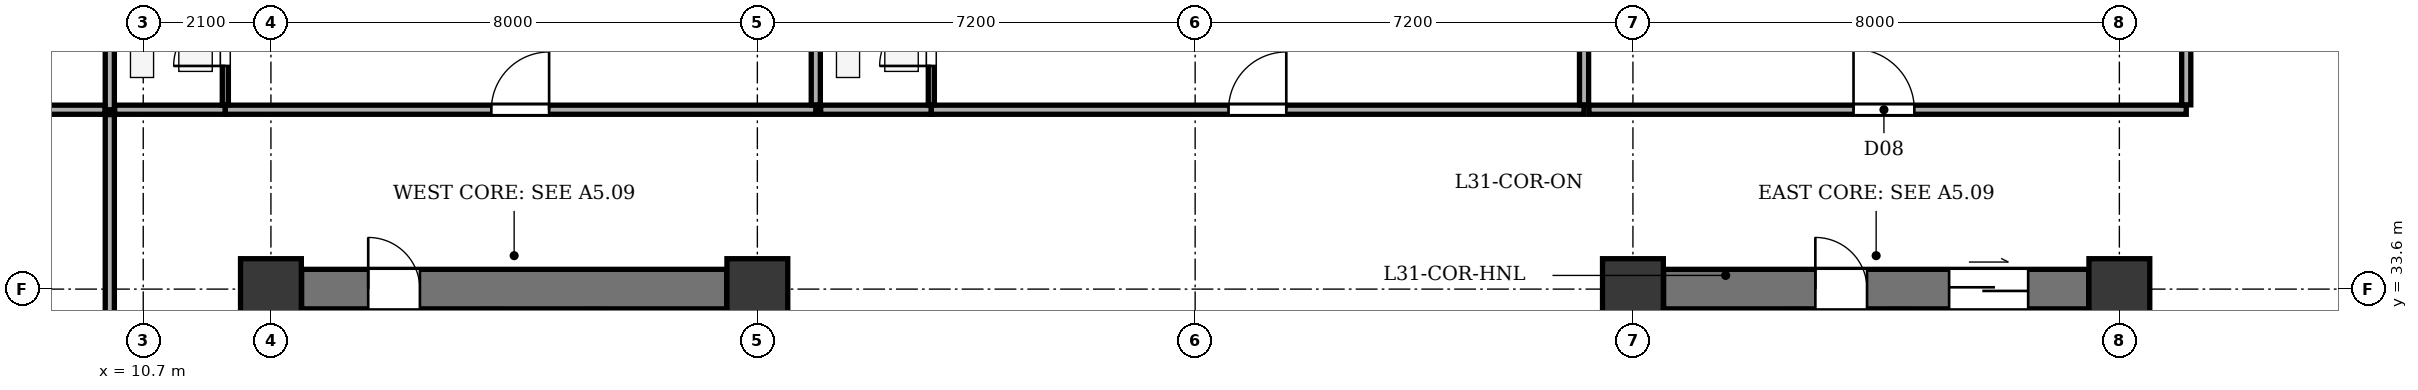
"""IFC4 building model, lengths in metres.
Left out: names, types, materials, properties, quantities, classifications, styles, units other than length and angle.
Written with IfcOpenShell. Run it as: python <this file> out.ifc"""

import sys

from ifc_helpers import new_model, si_unit, direction, frame, frame_2d, origin, origin_2d, place, context, subcontext, project, spatial, rectangle, extrude, element, fill, save


model = new_model("IFC4")
c1 = context("Model", 3, precision=1e-05, world=origin(), true_north=direction((0.0, 1.0)))
c2 = subcontext(c1, "Body", "Model", "MODEL_VIEW")
j1 = project(units=[si_unit("LENGTHUNIT", "METRE"), si_unit("PLANEANGLEUNIT", "RADIAN")], contexts=[c1])
p1 = place(None, origin())
s1 = spatial("IfcSite", under=j1, at=p1, CompositionType="ELEMENT")
p2 = place(p1, origin())
s2 = spatial("IfcBuilding", under=s1, at=p2, CompositionType="ELEMENT")
p3 = place(p2, frame((0.0, 0.0, 127.3)))
s3 = spatial("IfcBuildingStorey", under=s2, at=p3, CompositionType="ELEMENT", Elevation=127.3)
for number, where, z_axis, x_axis in (
    (1, (12.8, 33.6, 0.0), (0.0, 0.0, 1.0), (1.0, 0.0, 0.0)),
    (2, (20.8, 33.6, 0.0), (0.0, 0.0, 1.0), (1.0, 0.0, 0.0)),
    (3, (35.2, 33.6, 0.0), (0.0, 0.0, 1.0), (1.0, 0.0, 0.0)),
    (4, (43.2, 33.6, 0.0), (0.0, 0.0, 1.0), (1.0, 0.0, 0.0)),
):
    element("IfcColumn", number, at=place(p3, frame(where, z_axis=z_axis, x_axis=x_axis)), inside=s3, PredefinedType="COLUMN", context=c2, shape_type="SweptSolid", body=[
        extrude(rectangle(XDim=1.0, YDim=1.0, at=origin_2d()), origin(), (0.0, 0.0, 1.0), 3.5),
    ])
p4 = place(p3, frame((13.305, 33.6, 0.0), z_axis=(0.0, 0.0, 1.0), x_axis=(1.0, 0.0, 0.0)))
e5 = element("IfcWall", 5, at=p4, inside=s3, PredefinedType="SHEAR", context=c2, shape_type="SweptSolid", body=[
    extrude(rectangle(XDim=6.99, YDim=0.65, at=frame_2d((3.495, 0.0))), origin(), (0.0, 0.0, 1.0), 3.2),
])
p5 = place(p4, frame((1.095, 0.0, 0.0)))
e6 = element("IfcOpeningElement", 6, at=p5, cuts=e5, PredefinedType="OPENING", context=c2, shape_type="SweptSolid", body=[
    extrude(rectangle(XDim=0.85, YDim=2.02, at=frame_2d((0.425, 1.01))), frame((0.0, 0.335, 0.0), z_axis=(0.0, -1.0, 0.0), x_axis=(1.0, 0.0, 0.0)), (0.0, 0.0, 1.0), 0.67),
])
p6 = place(p3, frame((16.435, 21.135, 0.0), z_axis=(0.0, 0.0, 1.0), x_axis=(0.0, 1.0, 0.0)))
e7 = element("IfcWall", 7, at=p6, inside=s3, PredefinedType="SHEAR", context=c2, shape_type="SweptSolid", body=[
    extrude(rectangle(XDim=12.13, YDim=0.25, at=frame_2d((6.065, 0.0))), origin(), (0.0, 0.0, 1.0), 3.2),
])
p7 = place(p6, frame((0.515, 0.0, 0.0)))
e8 = element("IfcOpeningElement", 8, at=p7, cuts=e7, PredefinedType="OPENING", context=c2, shape_type="SweptSolid", body=[
    extrude(rectangle(XDim=1.2, YDim=2.15, at=frame_2d((0.6, 1.075))), frame((0.0, 0.135, 0.0), z_axis=(0.0, -1.0, 0.0), x_axis=(1.0, 0.0, 0.0)), (0.0, 0.0, 1.0), 0.27),
])
p8 = place(p6, frame((2.665, 0.0, 0.0)))
e9 = element("IfcOpeningElement", 9, at=p8, cuts=e7, PredefinedType="OPENING", context=c2, shape_type="SweptSolid", body=[
    extrude(rectangle(XDim=1.15, YDim=2.15, at=frame_2d((0.575, 1.075))), frame((0.0, 0.135, 0.0), z_axis=(0.0, -1.0, 0.0), x_axis=(1.0, 0.0, 0.0)), (0.0, 0.0, 1.0), 0.27),
])
p9 = place(p3, frame((18.12, 31.17, 0.0), z_axis=(0.0, 0.0, 1.0), x_axis=(0.0, 1.0, 0.0)))
e10 = element("IfcWall", 10, at=p9, inside=s3, PredefinedType="PARTITIONING", context=c2, shape_type="SweptSolid", body=[
    extrude(rectangle(XDim=2.095, YDim=0.18, at=frame_2d((1.047, 0.0))), origin(), (0.0, 0.0, 1.0), 3.2),
])
p10 = place(p3, frame((35.705, 33.6, 0.0), z_axis=(0.0, 0.0, 1.0), x_axis=(1.0, 0.0, 0.0)))
e11 = element("IfcWall", 11, at=p10, inside=s3, PredefinedType="SHEAR", context=c2, shape_type="SweptSolid", body=[
    extrude(rectangle(XDim=6.99, YDim=0.65, at=frame_2d((3.495, 0.0))), origin(), (0.0, 0.0, 1.0), 3.2),
])
p11 = place(p10, frame((4.695, 0.0, 0.0)))
e12 = element("IfcOpeningElement", 12, at=p11, cuts=e11, PredefinedType="OPENING", context=c2, shape_type="SweptSolid", body=[
    extrude(rectangle(XDim=1.3, YDim=2.15, at=frame_2d((0.65, 1.075))), frame((0.0, 0.335, 0.0), z_axis=(0.0, -1.0, 0.0), x_axis=(1.0, 0.0, 0.0)), (0.0, 0.0, 1.0), 0.67),
])
p12 = place(p10, frame((2.495, 0.0, 0.0)))
e13 = element("IfcOpeningElement", 13, at=p12, cuts=e11, PredefinedType="OPENING", context=c2, shape_type="SweptSolid", body=[
    extrude(rectangle(XDim=0.85, YDim=2.02, at=frame_2d((0.425, 1.01))), frame((0.0, 0.335, 0.0), z_axis=(0.0, -1.0, 0.0), x_axis=(1.0, 0.0, 0.0)), (0.0, 0.0, 1.0), 0.67),
])
p13 = place(p3, frame((39.565, 21.135, 0.0), z_axis=(0.0, 0.0, 1.0), x_axis=(0.0, 1.0, 0.0)))
e14 = element("IfcWall", 14, at=p13, inside=s3, PredefinedType="SHEAR", context=c2, shape_type="SweptSolid", body=[
    extrude(rectangle(XDim=12.13, YDim=0.25, at=frame_2d((6.065, 0.0))), origin(), (0.0, 0.0, 1.0), 3.2),
])
p14 = place(p13, frame((0.515, 0.0, 0.0)))
e15 = element("IfcOpeningElement", 15, at=p14, cuts=e14, PredefinedType="OPENING", context=c2, shape_type="SweptSolid", body=[
    extrude(rectangle(XDim=1.2, YDim=2.15, at=frame_2d((0.6, 1.075))), frame((0.0, 0.135, 0.0), z_axis=(0.0, -1.0, 0.0), x_axis=(1.0, 0.0, 0.0)), (0.0, 0.0, 1.0), 0.27),
])
p15 = place(p13, frame((2.665, 0.0, 0.0)))
e16 = element("IfcOpeningElement", 16, at=p15, cuts=e14, PredefinedType="OPENING", context=c2, shape_type="SweptSolid", body=[
    extrude(rectangle(XDim=1.15, YDim=2.15, at=frame_2d((0.575, 1.075))), frame((0.0, 0.135, 0.0), z_axis=(0.0, -1.0, 0.0), x_axis=(1.0, 0.0, 0.0)), (0.0, 0.0, 1.0), 0.27),
])
p16 = place(p3, frame((37.9, 25.27, 0.0), z_axis=(0.0, 0.0, 1.0), x_axis=(0.0, 1.0, 0.0)))
e17 = element("IfcWall", 17, at=p16, inside=s3, PredefinedType="SOLIDWALL", context=c2, shape_type="SweptSolid", body=[
    extrude(rectangle(XDim=7.995, YDim=0.2, at=frame_2d((3.998, 0.0))), origin(), (0.0, 0.0, 1.0), 3.2),
])
p17 = place(p3, frame((10.15, 36.55, 0.0), z_axis=(0.0, 0.0, 1.0), x_axis=(0.0, 1.0, 0.0)))
e18 = element("IfcWall", 18, at=p17, inside=s3, PredefinedType="PARTITIONING", context=c2, shape_type="SweptSolid", body=[
    extrude(rectangle(XDim=9.575, YDim=0.15, at=frame_2d((4.788, 0.0))), origin(), (0.0, 0.0, 1.0), 3.2),
])
p18 = place(p3, frame((10.23, 36.55, 0.0), z_axis=(0.0, 0.0, 1.0), x_axis=(1.0, 0.0, 0.0)))
e19 = element("IfcWall", 19, at=p18, inside=s3, PredefinedType="PARTITIONING", context=c2, shape_type="SweptSolid", body=[
    extrude(rectangle(XDim=1.82, YDim=0.15, at=frame_2d((0.91, 0.0))), origin(), (0.0, 0.0, 1.0), 3.2),
])
p19 = place(p3, frame((12.05, 36.55, 0.0), z_axis=(0.0, 0.0, 1.0), x_axis=(1.0, 0.0, 0.0)))
e20 = element("IfcWall", 20, at=p19, inside=s3, PredefinedType="PARTITIONING", context=c2, shape_type="SweptSolid", body=[
    extrude(rectangle(XDim=9.711, YDim=0.15, at=frame_2d((4.855, 0.0))), origin(), (0.0, 0.0, 1.0), 3.2),
])
p20 = place(p19, frame((4.375, 0.0, 0.0)))
e21 = element("IfcOpeningElement", 21, at=p20, cuts=e20, PredefinedType="OPENING", context=c2, shape_type="SweptSolid", body=[
    extrude(rectangle(XDim=0.95, YDim=2.1, at=frame_2d((0.475, 1.05))), frame((0.0, 0.085, 0.0), z_axis=(0.0, -1.0, 0.0), x_axis=(1.0, 0.0, 0.0)), (0.0, 0.0, 1.0), 0.17),
])
p21 = place(p3, frame((12.05, 36.63, 0.0), z_axis=(0.0, 0.0, 1.0), x_axis=(0.0, 1.0, 0.0)))
e22 = element("IfcWall", 22, at=p21, inside=s3, PredefinedType="PARTITIONING", context=c2, shape_type="SweptSolid", body=[
    extrude(rectangle(XDim=2.25, YDim=0.1, at=frame_2d((1.125, 0.0))), origin(), (0.0, 0.0, 1.0), 3.2),
])
p22 = place(p21, frame((0.64, 0.0, 0.0)))
e23 = element("IfcOpeningElement", 23, at=p22, cuts=e22, PredefinedType="OPENING", context=c2, shape_type="SweptSolid", body=[
    extrude(rectangle(XDim=0.85, YDim=2.05, at=frame_2d((0.425, 1.025))), frame((0.0, 0.06, 0.0), z_axis=(0.0, -1.0, 0.0), x_axis=(1.0, 0.0, 0.0)), (0.0, 0.0, 1.0), 0.12),
])
p23 = place(p3, frame((21.761, 36.63, 0.0), z_axis=(0.0, 0.0, 1.0), x_axis=(0.0, 1.0, 0.0)))
e24 = element("IfcWall", 24, at=p23, inside=s3, PredefinedType="PARTITIONING", context=c2, shape_type="SweptSolid", body=[
    extrude(rectangle(XDim=9.495, YDim=0.15, at=frame_2d((4.748, 0.0))), origin(), (0.0, 0.0, 1.0), 3.2),
])
p24 = place(p3, frame((21.841, 36.55, 0.0), z_axis=(0.0, 0.0, 1.0), x_axis=(1.0, 0.0, 0.0)))
e25 = element("IfcWall", 25, at=p24, inside=s3, PredefinedType="PARTITIONING", context=c2, shape_type="SweptSolid", body=[
    extrude(rectangle(XDim=1.82, YDim=0.15, at=frame_2d((0.91, 0.0))), origin(), (0.0, 0.0, 1.0), 3.2),
])
p25 = place(p3, frame((23.661, 36.55, 0.0), z_axis=(0.0, 0.0, 1.0), x_axis=(1.0, 0.0, 0.0)))
e26 = element("IfcWall", 26, at=p25, inside=s3, PredefinedType="PARTITIONING", context=c2, shape_type="SweptSolid", body=[
    extrude(rectangle(XDim=10.735, YDim=0.15, at=frame_2d((5.368, 0.0))), origin(), (0.0, 0.0, 1.0), 3.2),
])
p26 = place(p25, frame((4.888, 0.0, 0.0)))
e27 = element("IfcOpeningElement", 27, at=p26, cuts=e26, PredefinedType="OPENING", context=c2, shape_type="SweptSolid", body=[
    extrude(rectangle(XDim=0.95, YDim=2.1, at=frame_2d((0.475, 1.05))), frame((0.0, 0.085, 0.0), z_axis=(0.0, -1.0, 0.0), x_axis=(1.0, 0.0, 0.0)), (0.0, 0.0, 1.0), 0.17),
])
p27 = place(p3, frame((23.661, 36.63, 0.0), z_axis=(0.0, 0.0, 1.0), x_axis=(0.0, 1.0, 0.0)))
e28 = element("IfcWall", 28, at=p27, inside=s3, PredefinedType="PARTITIONING", context=c2, shape_type="SweptSolid", body=[
    extrude(rectangle(XDim=2.25, YDim=0.1, at=frame_2d((1.125, 0.0))), origin(), (0.0, 0.0, 1.0), 3.2),
])
p28 = place(p27, frame((0.64, 0.0, 0.0)))
e29 = element("IfcOpeningElement", 29, at=p28, cuts=e28, PredefinedType="OPENING", context=c2, shape_type="SweptSolid", body=[
    extrude(rectangle(XDim=0.85, YDim=2.05, at=frame_2d((0.425, 1.025))), frame((0.0, 0.06, 0.0), z_axis=(0.0, -1.0, 0.0), x_axis=(1.0, 0.0, 0.0)), (0.0, 0.0, 1.0), 0.12),
])
p29 = place(p3, frame((34.396, 36.63, 0.0), z_axis=(0.0, 0.0, 1.0), x_axis=(0.0, 1.0, 0.0)))
e30 = element("IfcWall", 30, at=p29, inside=s3, PredefinedType="PARTITIONING", context=c2, shape_type="SweptSolid", body=[
    extrude(rectangle(XDim=9.495, YDim=0.15, at=frame_2d((4.748, 0.0))), origin(), (0.0, 0.0, 1.0), 3.2),
])
p30 = place(p3, frame((34.476, 36.55, 0.0), z_axis=(0.0, 0.0, 1.0), x_axis=(1.0, 0.0, 0.0)))
e31 = element("IfcWall", 31, at=p30, inside=s3, PredefinedType="PARTITIONING", context=c2, shape_type="SweptSolid", body=[
    extrude(rectangle(XDim=9.824, YDim=0.15, at=frame_2d((4.912, 0.0))), origin(), (0.0, 0.0, 1.0), 3.2),
])
p31 = place(p30, frame((4.352, 0.0, 0.0)))
e32 = element("IfcOpeningElement", 32, at=p31, cuts=e31, PredefinedType="OPENING", context=c2, shape_type="SweptSolid", body=[
    extrude(rectangle(XDim=1.0, YDim=2.1, at=frame_2d((0.5, 1.05))), frame((0.0, 0.085, 0.0), z_axis=(0.0, -1.0, 0.0), x_axis=(1.0, 0.0, 0.0)), (0.0, 0.0, 1.0), 0.17),
])
p32 = place(p3, frame((44.3, 36.63, 0.0), z_axis=(0.0, 0.0, 1.0), x_axis=(0.0, 1.0, 0.0)))
e33 = element("IfcWall", 33, at=p32, inside=s3, PredefinedType="PARTITIONING", context=c2, shape_type="SweptSolid", body=[
    extrude(rectangle(XDim=9.495, YDim=0.15, at=frame_2d((4.748, 0.0))), origin(), (0.0, 0.0, 1.0), 3.2),
])
p33 = place(p3, frame((4.675, 36.55, 0.0), z_axis=(0.0, 0.0, 1.0), x_axis=(1.0, 0.0, 0.0)))
e34 = element("IfcWall", 34, at=p33, inside=s3, PredefinedType="PARTITIONING", context=c2, shape_type="SweptSolid", body=[
    extrude(rectangle(XDim=5.395, YDim=0.15, at=frame_2d((2.698, 0.0))), origin(), (0.0, 0.0, 1.0), 3.2),
])
p34 = place(p3, frame((10.15, 17.93, 0.0), z_axis=(0.0, 0.0, 1.0), x_axis=(0.0, 1.0, 0.0)))
e35 = element("IfcWall", 35, at=p34, inside=s3, PredefinedType="PARTITIONING", context=c2, shape_type="SweptSolid", body=[
    extrude(rectangle(XDim=18.54, YDim=0.15, at=frame_2d((9.27, 0.0))), origin(), (0.0, 0.0, 1.0), 3.2),
])
p35 = place(p34, frame((8.79, 0.0, 0.0)))
e36 = element("IfcOpeningElement", 36, at=p35, cuts=e35, PredefinedType="OPENING", context=c2, shape_type="SweptSolid", body=[
    extrude(rectangle(XDim=0.95, YDim=2.1, at=frame_2d((0.475, 1.05))), frame((0.0, 0.085, 0.0), z_axis=(0.0, -1.0, 0.0), x_axis=(1.0, 0.0, 0.0)), (0.0, 0.0, 1.0), 0.17),
])
p36 = place(p5, origin())
e37 = element("IfcDoor", 37, at=p36, inside=s3, OperationType="SINGLE_SWING_LEFT", PredefinedType="DOOR", context=c2, shape_type="SweptSolid", body=[
    extrude(rectangle(XDim=0.85, YDim=2.02, at=frame_2d((0.425, 1.01))), frame((0.0, 0.025, 0.0), z_axis=(0.0, -1.0, 0.0), x_axis=(1.0, 0.0, 0.0)), (0.0, 0.0, 1.0), 0.05),
])
fill(e6, e37)
p37 = place(p11, origin())
e38 = element("IfcDoor", 38, at=p37, inside=s3, OperationType="DOUBLE_DOOR_SLIDING", PredefinedType="DOOR", context=c2, shape_type="SweptSolid", body=[
    extrude(rectangle(XDim=1.3, YDim=2.15, at=frame_2d((0.65, 1.075))), frame((0.0, 0.025, 0.0), z_axis=(0.0, -1.0, 0.0), x_axis=(1.0, 0.0, 0.0)), (0.0, 0.0, 1.0), 0.05),
])
fill(e12, e38)
p38 = place(p12, origin())
e39 = element("IfcDoor", 39, at=p38, inside=s3, OperationType="SINGLE_SWING_LEFT", PredefinedType="DOOR", context=c2, shape_type="SweptSolid", body=[
    extrude(rectangle(XDim=0.85, YDim=2.02, at=frame_2d((0.425, 1.01))), frame((0.0, 0.025, 0.0), z_axis=(0.0, -1.0, 0.0), x_axis=(1.0, 0.0, 0.0)), (0.0, 0.0, 1.0), 0.05),
])
fill(e13, e39)
p39 = place(p22, origin())
e40 = element("IfcDoor", 40, at=p39, inside=s3, OperationType="SINGLE_SWING_LEFT", PredefinedType="DOOR", context=c2, shape_type="SweptSolid", body=[
    extrude(rectangle(XDim=0.85, YDim=2.05, at=frame_2d((0.425, 1.025))), frame((0.0, 0.025, 0.0), z_axis=(0.0, -1.0, 0.0), x_axis=(1.0, 0.0, 0.0)), (0.0, 0.0, 1.0), 0.05),
])
fill(e23, e40)
p40 = place(p20, origin())
e41 = element("IfcDoor", 41, at=p40, inside=s3, OperationType="SINGLE_SWING_RIGHT", PredefinedType="DOOR", context=c2, shape_type="SweptSolid", body=[
    extrude(rectangle(XDim=0.95, YDim=2.1, at=frame_2d((0.475, 1.05))), frame((0.0, 0.025, 0.0), z_axis=(0.0, -1.0, 0.0), x_axis=(1.0, 0.0, 0.0)), (0.0, 0.0, 1.0), 0.05),
])
fill(e21, e41)
p41 = place(p28, origin())
e42 = element("IfcDoor", 42, at=p41, inside=s3, OperationType="SINGLE_SWING_LEFT", PredefinedType="DOOR", context=c2, shape_type="SweptSolid", body=[
    extrude(rectangle(XDim=0.85, YDim=2.05, at=frame_2d((0.425, 1.025))), frame((0.0, 0.025, 0.0), z_axis=(0.0, -1.0, 0.0), x_axis=(1.0, 0.0, 0.0)), (0.0, 0.0, 1.0), 0.05),
])
fill(e29, e42)
p42 = place(p26, origin())
e43 = element("IfcDoor", 43, at=p42, inside=s3, OperationType="SINGLE_SWING_RIGHT", PredefinedType="DOOR", context=c2, shape_type="SweptSolid", body=[
    extrude(rectangle(XDim=0.95, YDim=2.1, at=frame_2d((0.475, 1.05))), frame((0.0, 0.025, 0.0), z_axis=(0.0, -1.0, 0.0), x_axis=(1.0, 0.0, 0.0)), (0.0, 0.0, 1.0), 0.05),
])
fill(e27, e43)
p43 = place(p31, origin())
e44 = element("IfcDoor", 44, at=p43, inside=s3, OperationType="SINGLE_SWING_LEFT", PredefinedType="DOOR", context=c2, shape_type="SweptSolid", body=[
    extrude(rectangle(XDim=1.0, YDim=2.1, at=frame_2d((0.5, 1.05))), frame((0.0, 0.025, 0.0), z_axis=(0.0, -1.0, 0.0), x_axis=(1.0, 0.0, 0.0)), (0.0, 0.0, 1.0), 0.05),
])
fill(e32, e44)
save(model, sys.argv[1])
